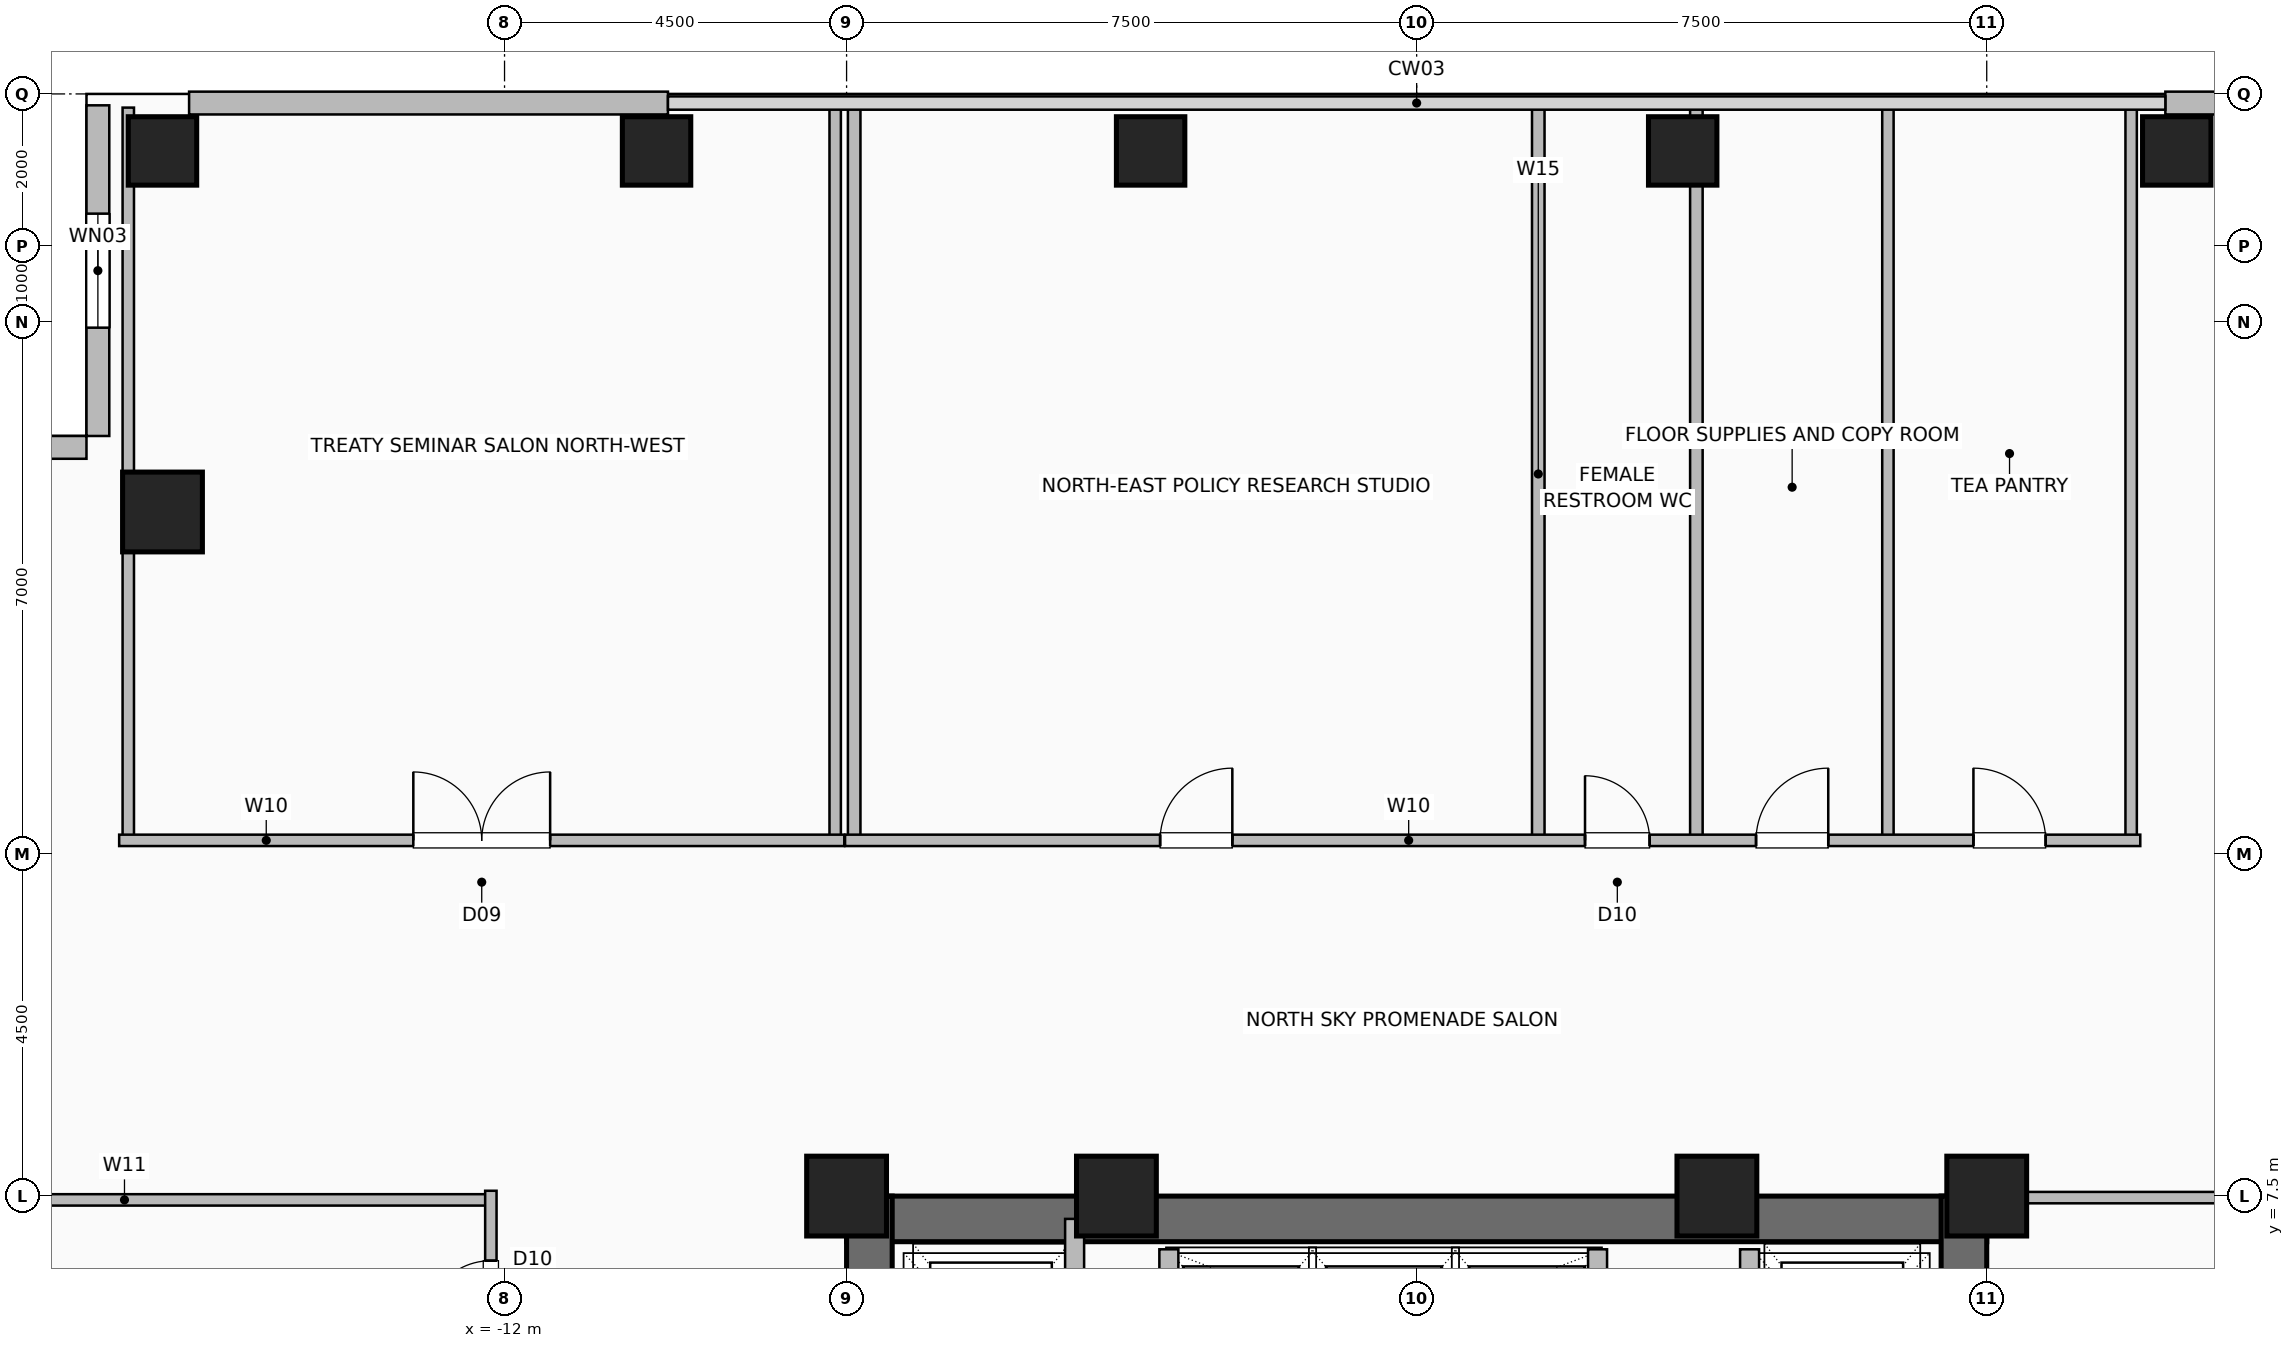
"""IFC4 building model, lengths in metres.
Left out: names, types, materials, properties, quantities, classifications, styles, units other than length and angle.
Written with IfcOpenShell. Run it as: python <this file> out.ifc"""

import sys

from ifc_helpers import new_model, si_unit, direction, frame, frame_2d, origin, origin_2d, place, context, subcontext, project, spatial, rectangle, hollow_rectangle, extrude, element, fill, save


model = new_model("IFC4")
c1 = context("Model", 3, precision=1e-05, world=origin(), true_north=direction((0.0, 1.0)))
c2 = subcontext(c1, "Body", "Model", "MODEL_VIEW")
j1 = project(units=[si_unit("LENGTHUNIT", "METRE"), si_unit("PLANEANGLEUNIT", "RADIAN")], contexts=[c1])
p1 = place(None, origin())
s1 = spatial("IfcSite", under=j1, at=p1, CompositionType="ELEMENT")
p2 = place(p1, origin())
s2 = spatial("IfcBuilding", under=s1, at=p2, CompositionType="ELEMENT")
p3 = place(p2, frame((0.0, 0.0, 101.2)))
s3 = spatial("IfcBuildingStorey", under=s2, at=p3, CompositionType="ELEMENT", Elevation=101.2)
for number, where, z_axis, x_axis in (
    (1, (7.5, 7.5, 0.0), (0.0, 0.0, 1.0), (1.0, 0.0, 0.0)),
    (2, (3.95, 7.5, 0.0), (0.0, 0.0, 1.0), (1.0, 0.0, 0.0)),
    (3, (-3.95, 7.5, 0.0), (0.0, 0.0, 1.0), (1.0, 0.0, 0.0)),
    (4, (-7.5, 7.5, 0.0), (0.0, 0.0, 1.0), (1.0, 0.0, 0.0)),
):
    element("IfcColumn", number, at=place(p3, frame(where, z_axis=z_axis, x_axis=x_axis)), inside=s3, PredefinedType="COLUMN", context=c2, shape_type="SweptSolid", body=[
        extrude(hollow_rectangle(XDim=1.05, YDim=1.05, WallThickness=0.05, at=origin_2d()), origin(), (0.0, 0.0, 1.0), 3.6),
    ])
for number, where, z_axis, x_axis in (
    (5, (-16.5, 21.25, 0.0), (0.0, 0.0, 1.0), (1.0, 0.0, 0.0)),
    (6, (-10.0, 21.25, 0.0), (0.0, 0.0, 1.0), (1.0, 0.0, 0.0)),
    (7, (-3.5, 21.25, 0.0), (0.0, 0.0, 1.0), (1.0, 0.0, 0.0)),
    (8, (3.5, 21.25, 0.0), (0.0, 0.0, 1.0), (1.0, 0.0, 0.0)),
    (9, (10.0, 21.25, 0.0), (0.0, 0.0, 1.0), (1.0, 0.0, 0.0)),
):
    element("IfcColumn", number, at=place(p3, frame(where, z_axis=z_axis, x_axis=x_axis)), inside=s3, PredefinedType="COLUMN", context=c2, shape_type="SweptSolid", body=[
        extrude(hollow_rectangle(XDim=0.9, YDim=0.9, WallThickness=0.045, at=origin_2d()), origin(), (0.0, 0.0, 1.0), 3.6),
    ])
p4 = place(p3, frame((-16.5, 16.5, 0.0), z_axis=(0.0, 0.0, 1.0), x_axis=(1.0, 0.0, 0.0)))
e10 = element("IfcColumn", 10, at=p4, inside=s3, PredefinedType="COLUMN", context=c2, shape_type="SweptSolid", body=[
    extrude(hollow_rectangle(XDim=1.05, YDim=1.05, WallThickness=0.05, at=origin_2d()), origin(), (0.0, 0.0, 1.0), 3.6),
])
for number, where, z_axis, x_axis in (
    (11, (-16.15, 21.88, 0.0), (0.0, 0.0, 1.0), (1.0, 0.0, 0.0)),
    (12, (9.85, 21.88, 0.0), (0.0, 0.0, 1.0), (1.0, 0.0, 0.0)),
):
    element("IfcWall", number, at=place(p3, frame(where, z_axis=z_axis, x_axis=x_axis)), inside=s3, PredefinedType="SOLIDWALL", context=c2, shape_type="SweptSolid", body=[
        extrude(rectangle(XDim=6.3, YDim=0.3, at=frame_2d((3.15, 0.0))), origin(), (0.0, 0.0, 1.0), 3.36),
    ])
p5 = place(p3, frame((-17.35, 21.85, 0.0), z_axis=(0.0, 0.0, 1.0), x_axis=(0.0, -1.0, 0.0)))
e13 = element("IfcWall", 13, at=p5, inside=s3, PredefinedType="SOLIDWALL", context=c2, shape_type="SweptSolid", body=[
    extrude(rectangle(XDim=4.35, YDim=0.3, at=frame_2d((2.175, 0.0))), origin(), (0.0, 0.0, 1.0), 3.36),
])
p6 = place(p5, frame((1.425, 0.0, 0.9)))
e14 = element("IfcOpeningElement", 14, at=p6, cuts=e13, PredefinedType="OPENING", context=c2, shape_type="SweptSolid", body=[
    extrude(rectangle(XDim=1.5, YDim=1.8, at=frame_2d((0.75, 0.9))), frame((0.0, 0.16, 0.0), z_axis=(0.0, -1.0, 0.0), x_axis=(1.0, 0.0, 0.0)), (0.0, 0.0, 1.0), 0.32),
])
p7 = place(p3, frame((-21.85, 17.35, 0.0), z_axis=(0.0, 0.0, 1.0), x_axis=(1.0, 0.0, 0.0)))
e15 = element("IfcWall", 15, at=p7, inside=s3, PredefinedType="SOLIDWALL", context=c2, shape_type="SweptSolid", body=[
    extrude(rectangle(XDim=4.35, YDim=0.3, at=frame_2d((2.175, 0.0))), origin(), (0.0, 0.0, 1.0), 3.36),
])
p8 = place(p3, frame((-7.5, 7.2, 0.0), z_axis=(0.0, 0.0, 1.0), x_axis=(1.0, 0.0, 0.0)))
e16 = element("IfcWall", 16, at=p8, inside=s3, PredefinedType="SHEAR", context=c2, shape_type="SweptSolid", body=[
    extrude(rectangle(XDim=15.0, YDim=0.6, at=frame_2d((7.5, 0.0))), origin(), (0.0, 0.0, 1.0), 3.36),
])
p9 = place(p3, frame((-7.2, -7.5, 0.0), z_axis=(0.0, 0.0, 1.0), x_axis=(0.0, 1.0, 0.0)))
e17 = element("IfcWall", 17, at=p9, inside=s3, PredefinedType="SHEAR", context=c2, shape_type="SweptSolid", body=[
    extrude(rectangle(XDim=15.0, YDim=0.6, at=frame_2d((7.5, 0.0))), origin(), (0.0, 0.0, 1.0), 3.36),
])
p10 = place(p9, frame((9.5, 0.0, 0.0)))
e18 = element("IfcOpeningElement", 18, at=p10, cuts=e17, PredefinedType="OPENING", context=c2, shape_type="SweptSolid", body=[
    extrude(rectangle(XDim=1.0, YDim=2.08, at=frame_2d((0.5, 1.04))), frame((0.0, 0.31, 0.0), z_axis=(0.0, -1.0, 0.0), x_axis=(1.0, 0.0, 0.0)), (0.0, 0.0, 1.0), 0.62),
])
p11 = place(p3, frame((7.2, -7.5, 0.0), z_axis=(0.0, 0.0, 1.0), x_axis=(0.0, 1.0, 0.0)))
e19 = element("IfcWall", 19, at=p11, inside=s3, PredefinedType="SHEAR", context=c2, shape_type="SweptSolid", body=[
    extrude(rectangle(XDim=15.0, YDim=0.6, at=frame_2d((7.5, 0.0))), origin(), (0.0, 0.0, 1.0), 3.36),
])
for number, where, z_axis, x_axis in (
    (20, (-3.26, 4.58, 0.0), (0.0, 0.0, 1.0), (0.0, 1.0, 0.0)),
    (21, (2.38, 4.58, 0.0), (0.0, 0.0, 1.0), (0.0, 1.0, 0.0)),
):
    element("IfcWall", number, at=place(p3, frame(where, z_axis=z_axis, x_axis=x_axis)), inside=s3, PredefinedType="SHEAR", context=c2, shape_type="SweptSolid", body=[
        extrude(rectangle(XDim=2.22, YDim=0.25, at=frame_2d((1.11, 0.0))), origin(), (0.0, 0.0, 1.0), 3.36),
    ])
p12 = place(p3, frame((-4.5, 4.35, 0.0), z_axis=(0.0, 0.0, 1.0), x_axis=(0.0, 1.0, 0.0)))
e22 = element("IfcWall", 22, at=p12, inside=s3, PredefinedType="SHEAR", context=c2, shape_type="SweptSolid", body=[
    extrude(rectangle(XDim=2.85, YDim=0.25, at=frame_2d((1.425, 0.0))), origin(), (0.0, 0.0, 1.0), 3.36),
])
p13 = place(p3, frame((4.38, 4.3, 0.0), z_axis=(0.0, 0.0, 1.0), x_axis=(0.0, 1.0, 0.0)))
e23 = element("IfcWall", 23, at=p13, inside=s3, PredefinedType="SHEAR", context=c2, shape_type="SweptSolid", body=[
    extrude(rectangle(XDim=2.5, YDim=0.25, at=frame_2d((1.25, 0.0))), origin(), (0.0, 0.0, 1.0), 3.36),
])
p14 = place(p13, frame((0.8, 0.0, 0.0)))
e24 = element("IfcOpeningElement", 24, at=p14, cuts=e23, PredefinedType="OPENING", context=c2, shape_type="SweptSolid", body=[
    extrude(rectangle(XDim=1.2, YDim=2.2, at=frame_2d((0.6, 1.1))), frame((0.0, 0.135, 0.0), z_axis=(0.0, -1.0, 0.0), x_axis=(1.0, 0.0, 0.0)), (0.0, 0.0, 1.0), 0.27),
])
p15 = place(p3, frame((-21.82, 7.45, 0.0), z_axis=(0.0, 0.0, 1.0), x_axis=(1.0, 0.0, 0.0)))
e25 = element("IfcWall", 25, at=p15, inside=s3, PredefinedType="PARTITIONING", context=c2, shape_type="SweptSolid", body=[
    extrude(rectangle(XDim=9.64, YDim=0.15, at=frame_2d((4.82, 0.0))), origin(), (0.0, 0.0, 1.0), 3.36),
])
p16 = place(p3, frame((-12.18, -7.57, 0.0), z_axis=(0.0, 0.0, 1.0), x_axis=(0.0, 1.0, 0.0)))
e26 = element("IfcWall", 26, at=p16, inside=s3, PredefinedType="PARTITIONING", context=c2, shape_type="SweptSolid", body=[
    extrude(rectangle(XDim=15.14, YDim=0.15, at=frame_2d((7.57, 0.0))), origin(), (0.0, 0.0, 1.0), 3.36),
])
p17 = place(p16, frame((2.62, 0.0, 0.0)))
e27 = element("IfcOpeningElement", 27, at=p17, cuts=e26, PredefinedType="OPENING", context=c2, shape_type="SweptSolid", body=[
    extrude(rectangle(XDim=0.95, YDim=2.06, at=frame_2d((0.475, 1.03))), frame((0.0, 0.085, 0.0), z_axis=(0.0, -1.0, 0.0), x_axis=(1.0, 0.0, 0.0)), (0.0, 0.0, 1.0), 0.17),
])
p18 = place(p16, frame((8.845, 0.0, 0.0)))
e28 = element("IfcOpeningElement", 28, at=p18, cuts=e26, PredefinedType="OPENING", context=c2, shape_type="SweptSolid", body=[
    extrude(rectangle(XDim=0.95, YDim=2.06, at=frame_2d((0.475, 1.03))), frame((0.0, 0.085, 0.0), z_axis=(0.0, -1.0, 0.0), x_axis=(1.0, 0.0, 0.0)), (0.0, 0.0, 1.0), 0.17),
])
p19 = place(p16, frame((13.37, 0.0, 0.0)))
e29 = element("IfcOpeningElement", 29, at=p19, cuts=e26, PredefinedType="OPENING", context=c2, shape_type="SweptSolid", body=[
    extrude(rectangle(XDim=0.85, YDim=2.05, at=frame_2d((0.425, 1.025))), frame((0.0, 0.085, 0.0), z_axis=(0.0, -1.0, 0.0), x_axis=(1.0, 0.0, 0.0)), (0.0, 0.0, 1.0), 0.17),
])
for number, where, z_axis, x_axis in (
    (30, (-16.95, 12.18, 0.0), (0.0, 0.0, 1.0), (0.0, 1.0, 0.0)),
    (31, (-7.65, 12.18, 0.0), (0.0, 0.0, 1.0), (0.0, 1.0, 0.0)),
):
    element("IfcWall", number, at=place(p3, frame(where, z_axis=z_axis, x_axis=x_axis)), inside=s3, PredefinedType="PARTITIONING", context=c2, shape_type="SweptSolid", body=[
        extrude(rectangle(XDim=9.64, YDim=0.15, at=frame_2d((4.82, 0.0))), origin(), (0.0, 0.0, 1.0), 3.36),
    ])
p20 = place(p3, frame((-17.07, 12.18, 0.0), z_axis=(0.0, 0.0, 1.0), x_axis=(1.0, 0.0, 0.0)))
e32 = element("IfcWall", 32, at=p20, inside=s3, PredefinedType="PARTITIONING", context=c2, shape_type="SweptSolid", body=[
    extrude(rectangle(XDim=9.54, YDim=0.15, at=frame_2d((4.77, 0.0))), origin(), (0.0, 0.0, 1.0), 3.36),
])
p21 = place(p20, frame((3.87, 0.0, 0.0)))
e33 = element("IfcOpeningElement", 33, at=p21, cuts=e32, PredefinedType="OPENING", context=c2, shape_type="SweptSolid", body=[
    extrude(rectangle(XDim=1.8, YDim=2.08, at=frame_2d((0.9, 1.04))), frame((0.0, 0.085, 0.0), z_axis=(0.0, -1.0, 0.0), x_axis=(1.0, 0.0, 0.0)), (0.0, 0.0, 1.0), 0.17),
])
for number, where, z_axis, x_axis in (
    (34, (3.68, 12.18, 0.0), (0.0, 0.0, 1.0), (0.0, 1.0, 0.0)),
    (35, (-7.4, 12.18, 0.0), (0.0, 0.0, 1.0), (0.0, 1.0, 0.0)),
    (36, (1.6, 12.18, 0.0), (0.0, 0.0, 1.0), (0.0, 1.0, 0.0)),
):
    element("IfcWall", number, at=place(p3, frame(where, z_axis=z_axis, x_axis=x_axis)), inside=s3, PredefinedType="PLUMBINGWALL", context=c2, shape_type="SweptSolid", body=[
        extrude(rectangle(XDim=9.64, YDim=0.165, at=frame_2d((4.82, 0.0))), origin(), (0.0, 0.0, 1.0), 3.36),
    ])
for number, where, z_axis, x_axis in (
    (37, (6.2, 12.18, 0.0), (0.0, 0.0, 1.0), (0.0, 1.0, 0.0)),
    (38, (9.4, 12.18, 0.0), (0.0, 0.0, 1.0), (0.0, 1.0, 0.0)),
):
    element("IfcWall", number, at=place(p3, frame(where, z_axis=z_axis, x_axis=x_axis)), inside=s3, PredefinedType="PARTITIONING", context=c2, shape_type="SweptSolid", body=[
        extrude(rectangle(XDim=9.64, YDim=0.15, at=frame_2d((4.82, 0.0))), origin(), (0.0, 0.0, 1.0), 3.36),
    ])
p22 = place(p3, frame((-7.52, 12.18, 0.0), z_axis=(0.0, 0.0, 1.0), x_axis=(1.0, 0.0, 0.0)))
e39 = element("IfcWall", 39, at=p22, inside=s3, PredefinedType="PARTITIONING", context=c2, shape_type="SweptSolid", body=[
    extrude(rectangle(XDim=17.04, YDim=0.15, at=frame_2d((8.52, 0.0))), origin(), (0.0, 0.0, 1.0), 3.36),
])
p23 = place(p22, frame((4.145, 0.0, 0.0)))
e40 = element("IfcOpeningElement", 40, at=p23, cuts=e39, PredefinedType="OPENING", context=c2, shape_type="SweptSolid", body=[
    extrude(rectangle(XDim=0.95, YDim=2.06, at=frame_2d((0.475, 1.03))), frame((0.0, 0.085, 0.0), z_axis=(0.0, -1.0, 0.0), x_axis=(1.0, 0.0, 0.0)), (0.0, 0.0, 1.0), 0.17),
])
p24 = place(p22, frame((9.735, 0.0, 0.0)))
e41 = element("IfcOpeningElement", 41, at=p24, cuts=e39, PredefinedType="OPENING", context=c2, shape_type="SweptSolid", body=[
    extrude(rectangle(XDim=0.85, YDim=2.05, at=frame_2d((0.425, 1.025))), frame((0.0, 0.085, 0.0), z_axis=(0.0, -1.0, 0.0), x_axis=(1.0, 0.0, 0.0)), (0.0, 0.0, 1.0), 0.17),
])
p25 = place(p22, frame((11.985, 0.0, 0.0)))
e42 = element("IfcOpeningElement", 42, at=p25, cuts=e39, PredefinedType="OPENING", context=c2, shape_type="SweptSolid", body=[
    extrude(rectangle(XDim=0.95, YDim=2.06, at=frame_2d((0.475, 1.03))), frame((0.0, 0.085, 0.0), z_axis=(0.0, -1.0, 0.0), x_axis=(1.0, 0.0, 0.0)), (0.0, 0.0, 1.0), 0.17),
])
p26 = place(p22, frame((14.845, 0.0, 0.0)))
e43 = element("IfcOpeningElement", 43, at=p26, cuts=e39, PredefinedType="OPENING", context=c2, shape_type="SweptSolid", body=[
    extrude(rectangle(XDim=0.95, YDim=2.06, at=frame_2d((0.475, 1.03))), frame((0.0, 0.085, 0.0), z_axis=(0.0, -1.0, 0.0), x_axis=(1.0, 0.0, 0.0)), (0.0, 0.0, 1.0), 0.17),
])
p27 = place(p3, frame((7.6, 7.48, 0.0), z_axis=(0.0, 0.0, 1.0), x_axis=(1.0, 0.0, 0.0)))
e44 = element("IfcWall", 44, at=p27, inside=s3, PredefinedType="PARTITIONING", context=c2, shape_type="SweptSolid", body=[
    extrude(rectangle(XDim=14.22, YDim=0.15, at=frame_2d((7.11, 0.0))), origin(), (0.0, 0.0, 1.0), 3.36),
])
p28 = place(p6, origin())
e45 = element("IfcWindow", 45, at=p28, inside=s3, PartitioningType="SINGLE_PANEL", PredefinedType="WINDOW", context=c2, shape_type="SweptSolid", body=[
    extrude(rectangle(XDim=1.5, YDim=1.8, at=frame_2d((0.75, 0.9))), frame((0.0, 0.03, 0.0), z_axis=(0.0, -1.0, 0.0), x_axis=(1.0, 0.0, 0.0)), (0.0, 0.0, 1.0), 0.06),
])
fill(e14, e45)
p29 = place(p19, origin())
e46 = element("IfcDoor", 46, at=p29, inside=s3, OperationType="SINGLE_SWING_LEFT", PredefinedType="DOOR", context=c2, shape_type="SweptSolid", body=[
    extrude(rectangle(XDim=0.85, YDim=2.05, at=frame_2d((0.425, 1.025))), frame((0.0, 0.025, 0.0), z_axis=(0.0, -1.0, 0.0), x_axis=(1.0, 0.0, 0.0)), (0.0, 0.0, 1.0), 0.05),
])
fill(e29, e46)
p30 = place(p21, origin())
e47 = element("IfcDoor", 47, at=p30, inside=s3, OperationType="DOUBLE_DOOR_SINGLE_SWING", PredefinedType="DOOR", context=c2, shape_type="SweptSolid", body=[
    extrude(rectangle(XDim=1.8, YDim=2.08, at=frame_2d((0.9, 1.04))), frame((0.0, 0.025, 0.0), z_axis=(0.0, -1.0, 0.0), x_axis=(1.0, 0.0, 0.0)), (0.0, 0.0, 1.0), 0.05),
])
fill(e33, e47)
p31 = place(p23, origin())
e48 = element("IfcDoor", 48, at=p31, inside=s3, OperationType="SINGLE_SWING_RIGHT", PredefinedType="DOOR", context=c2, shape_type="SweptSolid", body=[
    extrude(rectangle(XDim=0.95, YDim=2.06, at=frame_2d((0.475, 1.03))), frame((0.0, 0.025, 0.0), z_axis=(0.0, -1.0, 0.0), x_axis=(1.0, 0.0, 0.0)), (0.0, 0.0, 1.0), 0.05),
])
fill(e40, e48)
p32 = place(p24, origin())
e49 = element("IfcDoor", 49, at=p32, inside=s3, OperationType="SINGLE_SWING_LEFT", PredefinedType="DOOR", context=c2, shape_type="SweptSolid", body=[
    extrude(rectangle(XDim=0.85, YDim=2.05, at=frame_2d((0.425, 1.025))), frame((0.0, 0.025, 0.0), z_axis=(0.0, -1.0, 0.0), x_axis=(1.0, 0.0, 0.0)), (0.0, 0.0, 1.0), 0.05),
])
fill(e41, e49)
p33 = place(p25, origin())
e50 = element("IfcDoor", 50, at=p33, inside=s3, OperationType="SINGLE_SWING_RIGHT", PredefinedType="DOOR", context=c2, shape_type="SweptSolid", body=[
    extrude(rectangle(XDim=0.95, YDim=2.06, at=frame_2d((0.475, 1.03))), frame((0.0, 0.025, 0.0), z_axis=(0.0, -1.0, 0.0), x_axis=(1.0, 0.0, 0.0)), (0.0, 0.0, 1.0), 0.05),
])
fill(e42, e50)
p34 = place(p26, origin())
e51 = element("IfcDoor", 51, at=p34, inside=s3, OperationType="SINGLE_SWING_LEFT", PredefinedType="DOOR", context=c2, shape_type="SweptSolid", body=[
    extrude(rectangle(XDim=0.95, YDim=2.06, at=frame_2d((0.475, 1.03))), frame((0.0, 0.025, 0.0), z_axis=(0.0, -1.0, 0.0), x_axis=(1.0, 0.0, 0.0)), (0.0, 0.0, 1.0), 0.05),
])
fill(e43, e51)
save(model, sys.argv[1])
